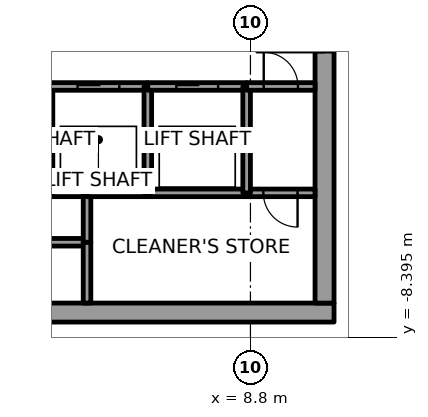
"""IFC4 building model, lengths in metres.
Left out: names, types, materials, properties, quantities, classifications, styles, units other than length and angle.
Written with IfcOpenShell. Run it as: python <this file> out.ifc"""

import sys

from ifc_helpers import new_model, si_unit, direction, frame, frame_2d, origin, place, context, subcontext, project, spatial, rectangle, extrude, element, fill, save


model = new_model("IFC4")
c1 = context("Model", 3, precision=1e-05, world=origin(), true_north=direction((0.0, 1.0)))
c2 = subcontext(c1, "Body", "Model", "MODEL_VIEW")
j1 = project(units=[si_unit("LENGTHUNIT", "METRE"), si_unit("PLANEANGLEUNIT", "RADIAN")], contexts=[c1])
p1 = place(None, origin())
s1 = spatial("IfcSite", under=j1, at=p1, CompositionType="ELEMENT")
p2 = place(p1, origin())
s2 = spatial("IfcBuilding", under=s1, at=p2, CompositionType="ELEMENT")
p3 = place(p2, frame((0.0, 0.0, 153.8)))
s3 = spatial("IfcBuildingStorey", under=s2, at=p3, CompositionType="ELEMENT", Elevation=153.8)
p4 = place(p3, frame((-11.0, -7.75, 0.0), z_axis=(0.0, 0.0, 1.0), x_axis=(1.0, 0.0, 0.0)))
e1 = element("IfcWall", 1, at=p4, inside=s3, PredefinedType="SHEAR", context=c2, shape_type="SweptSolid", body=[
    extrude(rectangle(XDim=22.0, YDim=0.5, at=frame_2d((11.0, 0.0))), origin(), (0.0, 0.0, 1.0), 4.0),
])
p5 = place(p4, frame((10.45, 0.0, 0.0)))
e2 = element("IfcOpeningElement", 2, at=p5, cuts=e1, PredefinedType="OPENING", context=c2, shape_type="SweptSolid", body=[
    extrude(rectangle(XDim=1.1, YDim=2.1, at=frame_2d((0.55, 1.05))), frame((0.0, 0.25, 0.0), z_axis=(0.0, -1.0, 0.0), x_axis=(1.0, 0.0, 0.0)), (0.0, 0.0, 1.0), 0.5),
])
p6 = place(p3, frame((10.75, -7.5, 0.0), z_axis=(0.0, 0.0, 1.0), x_axis=(0.0, 1.0, 0.0)))
e3 = element("IfcWall", 3, at=p6, inside=s3, PredefinedType="SHEAR", context=c2, shape_type="SweptSolid", body=[
    extrude(rectangle(XDim=15.0, YDim=0.5, at=frame_2d((7.5, 0.0))), origin(), (0.0, 0.0, 1.0), 4.0),
])
p7 = place(p6, frame((6.6, 0.0, 0.0)))
e4 = element("IfcOpeningElement", 4, at=p7, cuts=e3, PredefinedType="OPENING", context=c2, shape_type="SweptSolid", body=[
    extrude(rectangle(XDim=1.8, YDim=2.1, at=frame_2d((0.9, 1.05))), frame((0.0, 0.25, 0.0), z_axis=(0.0, -1.0, 0.0), x_axis=(1.0, 0.0, 0.0)), (0.0, 0.0, 1.0), 0.5),
])
p8 = place(p3, frame((4.5, -5.9, 0.0), z_axis=(0.0, 0.0, 1.0), x_axis=(-1.0, 0.0, 0.0)))
e5 = element("IfcWall", 5, at=p8, inside=s3, PredefinedType="SOLIDWALL", context=c2, shape_type="SweptSolid", body=[
    extrude(rectangle(XDim=2.5, YDim=0.2, at=frame_2d((1.25, 0.0))), origin(), (0.0, 0.0, 1.0), 3.85),
])
p9 = place(p3, frame((4.5, -4.6, 0.0), z_axis=(0.0, 0.0, 1.0), x_axis=(-1.0, 0.0, 0.0)))
e6 = element("IfcWall", 6, at=p9, inside=s3, PredefinedType="SOLIDWALL", context=c2, shape_type="SweptSolid", body=[
    extrude(rectangle(XDim=1.0, YDim=0.2, at=frame_2d((0.5, 0.0))), origin(), (0.0, 0.0, 1.0), 3.85),
])
p10 = place(p3, frame((3.5, -1.8, 0.0), z_axis=(0.0, 0.0, 1.0), x_axis=(1.0, 0.0, 0.0)))
e7 = element("IfcWall", 7, at=p10, inside=s3, PredefinedType="SOLIDWALL", context=c2, shape_type="SweptSolid", body=[
    extrude(rectangle(XDim=2.6, YDim=0.2, at=frame_2d((1.3, 0.0))), origin(), (0.0, 0.0, 1.0), 3.85),
])
p11 = place(p10, frame((0.75, 0.0, 0.0)))
e8 = element("IfcOpeningElement", 8, at=p11, cuts=e7, PredefinedType="OPENING", context=c2, shape_type="SweptSolid", body=[
    extrude(rectangle(XDim=1.1, YDim=2.1, at=frame_2d((0.55, 1.05))), frame((0.0, 0.1, 0.0), z_axis=(0.0, -1.0, 0.0), x_axis=(1.0, 0.0, 0.0)), (0.0, 0.0, 1.0), 0.2),
])
p12 = place(p3, frame((4.5, -5.9, 0.0), z_axis=(0.0, 0.0, 1.0), x_axis=(0.0, -1.0, 0.0)))
e9 = element("IfcWall", 9, at=p12, inside=s3, PredefinedType="SOLIDWALL", context=c2, shape_type="SweptSolid", body=[
    extrude(rectangle(XDim=1.6, YDim=0.2, at=frame_2d((0.8, 0.0))), origin(), (0.0, 0.0, 1.0), 3.85),
])
p13 = place(p3, frame((4.5, -4.6, 0.0), z_axis=(0.0, 0.0, 1.0), x_axis=(0.0, -1.0, 0.0)))
e10 = element("IfcWall", 10, at=p13, inside=s3, PredefinedType="SOLIDWALL", context=c2, shape_type="SweptSolid", body=[
    extrude(rectangle(XDim=1.3, YDim=0.2, at=frame_2d((0.65, 0.0))), origin(), (0.0, 0.0, 1.0), 3.85),
])
p14 = place(p3, frame((6.1, -4.6, 0.0), z_axis=(0.0, 0.0, 1.0), x_axis=(-1.0, 0.0, 0.0)))
e11 = element("IfcWall", 11, at=p14, inside=s3, PredefinedType="SOLIDWALL", context=c2, shape_type="SweptSolid", body=[
    extrude(rectangle(XDim=1.6, YDim=0.2, at=frame_2d((0.8, 0.0))), origin(), (0.0, 0.0, 1.0), 3.85),
])
p15 = place(p3, frame((8.7, -4.6, 0.0), z_axis=(0.0, 0.0, 1.0), x_axis=(-1.0, 0.0, 0.0)))
e12 = element("IfcWall", 12, at=p15, inside=s3, PredefinedType="SOLIDWALL", context=c2, shape_type="SweptSolid", body=[
    extrude(rectangle(XDim=2.6, YDim=0.2, at=frame_2d((1.3, 0.0))), origin(), (0.0, 0.0, 1.0), 3.85),
])
p16 = place(p3, frame((6.1, -4.6, 0.0), z_axis=(0.0, 0.0, 1.0), x_axis=(0.0, 1.0, 0.0)))
e13 = element("IfcWall", 13, at=p16, inside=s3, PredefinedType="SOLIDWALL", context=c2, shape_type="SweptSolid", body=[
    extrude(rectangle(XDim=2.8, YDim=0.2, at=frame_2d((1.4, 0.0))), origin(), (0.0, 0.0, 1.0), 3.85),
])
p17 = place(p3, frame((6.1, -1.8, 0.0), z_axis=(0.0, 0.0, 1.0), x_axis=(1.0, 0.0, 0.0)))
e14 = element("IfcWall", 14, at=p17, inside=s3, PredefinedType="SOLIDWALL", context=c2, shape_type="SweptSolid", body=[
    extrude(rectangle(XDim=2.6, YDim=0.2, at=frame_2d((1.3, 0.0))), origin(), (0.0, 0.0, 1.0), 3.85),
])
p18 = place(p17, frame((0.75, 0.0, 0.0)))
e15 = element("IfcOpeningElement", 15, at=p18, cuts=e14, PredefinedType="OPENING", context=c2, shape_type="SweptSolid", body=[
    extrude(rectangle(XDim=1.1, YDim=2.1, at=frame_2d((0.55, 1.05))), frame((0.0, 0.1, 0.0), z_axis=(0.0, -1.0, 0.0), x_axis=(1.0, 0.0, 0.0)), (0.0, 0.0, 1.0), 0.2),
])
p19 = place(p3, frame((10.5, -4.6, 0.0), z_axis=(0.0, 0.0, 1.0), x_axis=(-1.0, 0.0, 0.0)))
e16 = element("IfcWall", 16, at=p19, inside=s3, PredefinedType="SOLIDWALL", context=c2, shape_type="SweptSolid", body=[
    extrude(rectangle(XDim=1.8, YDim=0.2, at=frame_2d((0.9, 0.0))), origin(), (0.0, 0.0, 1.0), 3.85),
])
p20 = place(p19, frame((0.46, 0.0, 0.0)))
e17 = element("IfcOpeningElement", 17, at=p20, cuts=e16, PredefinedType="OPENING", context=c2, shape_type="SweptSolid", body=[
    extrude(rectangle(XDim=0.9, YDim=2.1, at=frame_2d((0.45, 1.05))), frame((0.0, 0.1, 0.0), z_axis=(0.0, -1.0, 0.0), x_axis=(1.0, 0.0, 0.0)), (0.0, 0.0, 1.0), 0.2),
])
p21 = place(p3, frame((8.7, -1.8, 0.0), z_axis=(0.0, 0.0, 1.0), x_axis=(0.0, -1.0, 0.0)))
e18 = element("IfcWall", 18, at=p21, inside=s3, PredefinedType="SOLIDWALL", context=c2, shape_type="SweptSolid", body=[
    extrude(rectangle(XDim=2.8, YDim=0.2, at=frame_2d((1.4, 0.0))), origin(), (0.0, 0.0, 1.0), 3.85),
])
p22 = place(p3, frame((8.7, -1.8, 0.0), z_axis=(0.0, 0.0, 1.0), x_axis=(1.0, 0.0, 0.0)))
e19 = element("IfcWall", 19, at=p22, inside=s3, PredefinedType="SOLIDWALL", context=c2, shape_type="SweptSolid", body=[
    extrude(rectangle(XDim=1.8, YDim=0.2, at=frame_2d((0.9, 0.0))), origin(), (0.0, 0.0, 1.0), 3.85),
])
p23 = place(p22, frame((0.45, 0.0, 0.0)))
e20 = element("IfcOpeningElement", 20, at=p23, cuts=e19, PredefinedType="OPENING", context=c2, shape_type="SweptSolid", body=[
    extrude(rectangle(XDim=0.9, YDim=2.1, at=frame_2d((0.45, 1.05))), frame((0.0, 0.1, 0.0), z_axis=(0.0, -1.0, 0.0), x_axis=(1.0, 0.0, 0.0)), (0.0, 0.0, 1.0), 0.2),
])
p24 = place(p11, origin())
e21 = element("IfcDoor", 21, at=p24, inside=s3, OperationType="SLIDING_TO_LEFT", PredefinedType="DOOR", context=c2, shape_type="SweptSolid", body=[
    extrude(rectangle(XDim=1.1, YDim=2.1, at=frame_2d((0.55, 1.05))), frame((0.0, 0.025, 0.0), z_axis=(0.0, -1.0, 0.0), x_axis=(1.0, 0.0, 0.0)), (0.0, 0.0, 1.0), 0.05),
])
fill(e8, e21)
p25 = place(p18, origin())
e22 = element("IfcDoor", 22, at=p25, inside=s3, OperationType="SLIDING_TO_LEFT", PredefinedType="DOOR", context=c2, shape_type="SweptSolid", body=[
    extrude(rectangle(XDim=1.1, YDim=2.1, at=frame_2d((0.55, 1.05))), frame((0.0, 0.025, 0.0), z_axis=(0.0, -1.0, 0.0), x_axis=(1.0, 0.0, 0.0)), (0.0, 0.0, 1.0), 0.05),
])
fill(e15, e22)
p26 = place(p20, origin())
e23 = element("IfcDoor", 23, at=p26, inside=s3, OperationType="SINGLE_SWING_RIGHT", PredefinedType="DOOR", context=c2, shape_type="SweptSolid", body=[
    extrude(rectangle(XDim=0.9, YDim=2.1, at=frame_2d((0.45, 1.05))), frame((0.0, 0.025, 0.0), z_axis=(0.0, -1.0, 0.0), x_axis=(1.0, 0.0, 0.0)), (0.0, 0.0, 1.0), 0.05),
])
fill(e17, e23)
p27 = place(p23, origin())
e24 = element("IfcDoor", 24, at=p27, inside=s3, OperationType="SINGLE_SWING_LEFT", PredefinedType="DOOR", context=c2, shape_type="SweptSolid", body=[
    extrude(rectangle(XDim=0.9, YDim=2.1, at=frame_2d((0.45, 1.05))), frame((0.0, 0.025, 0.0), z_axis=(0.0, -1.0, 0.0), x_axis=(1.0, 0.0, 0.0)), (0.0, 0.0, 1.0), 0.05),
])
fill(e20, e24)
p28 = place(p7, origin())
e25 = element("IfcDoor", 25, at=p28, inside=s3, OperationType="DOUBLE_DOOR_SINGLE_SWING", PredefinedType="DOOR", context=c2, shape_type="SweptSolid", body=[
    extrude(rectangle(XDim=1.8, YDim=2.1, at=frame_2d((0.9, 1.05))), frame((0.0, 0.025, 0.0), z_axis=(0.0, -1.0, 0.0), x_axis=(1.0, 0.0, 0.0)), (0.0, 0.0, 1.0), 0.05),
])
fill(e4, e25)
save(model, sys.argv[1])
